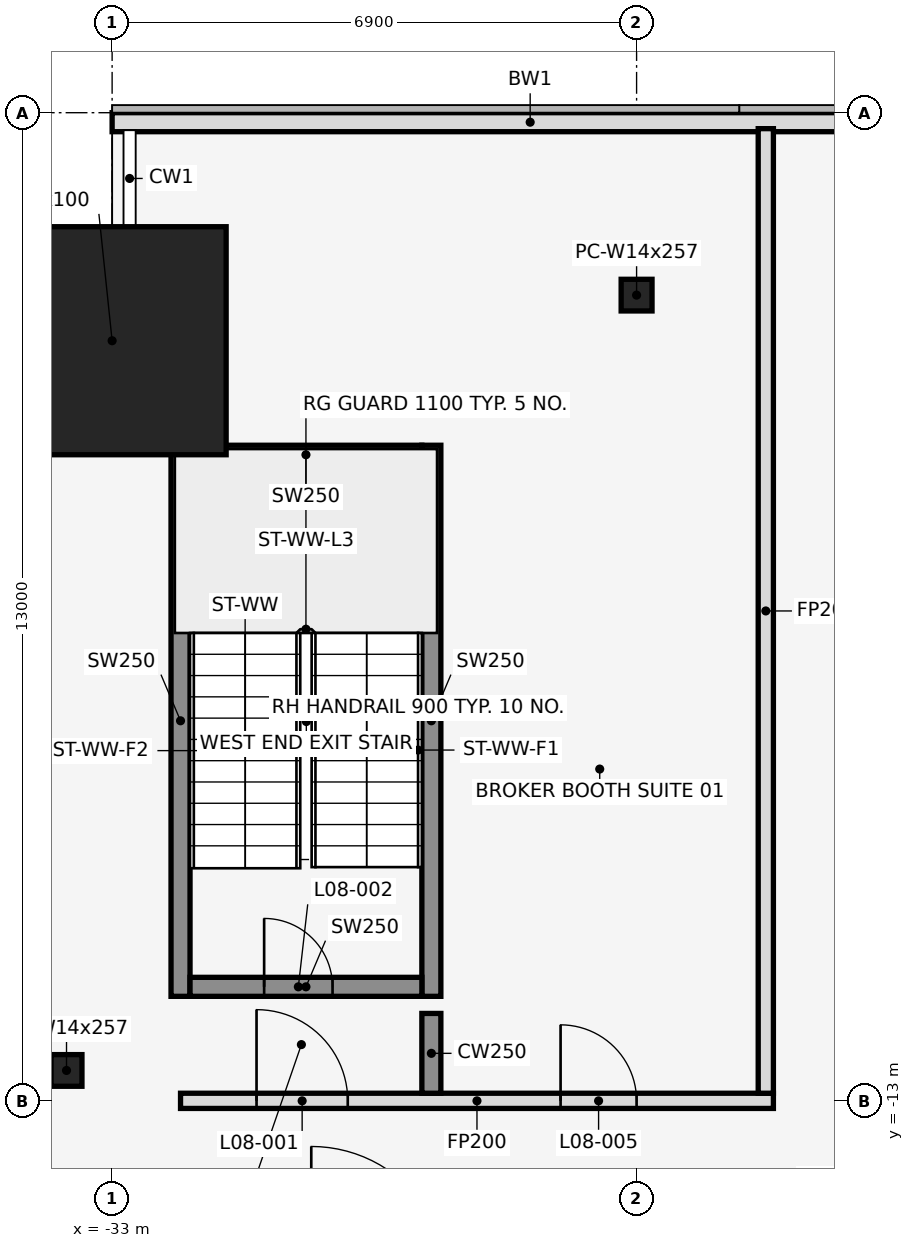
"""IFC4 building model, lengths in metres.
Left out: names, types, materials, properties, quantities, classifications, styles, units other than length and angle.
Written with IfcOpenShell. Run it as: python <this file> out.ifc"""

import sys

from ifc_helpers import new_model, si_unit, direction, frame, frame_2d, origin, origin_2d, place, context, subcontext, project, spatial, rectangle, hollow_rectangle, i_section, extrude, element, fill, save


model = new_model("IFC4")
c1 = context("Model", 3, precision=1e-05, world=origin(), true_north=direction((0.0, 1.0)))
c2 = subcontext(c1, "Body", "Model", "MODEL_VIEW")
j1 = project(units=[si_unit("LENGTHUNIT", "METRE"), si_unit("PLANEANGLEUNIT", "RADIAN")], contexts=[c1])
p1 = place(None, origin())
s1 = spatial("IfcSite", under=j1, at=p1, CompositionType="ELEMENT")
p2 = place(p1, origin())
s2 = spatial("IfcBuilding", under=s1, at=p2, CompositionType="ELEMENT")
p3 = place(p2, frame((0.0, 0.0, 44.0)))
s3 = spatial("IfcBuildingStorey", under=s2, at=p3, CompositionType="ELEMENT", Elevation=44.0)
p4 = place(p3, frame((-33.0, -3.0, 0.0), z_axis=(0.0, 0.0, 1.0), x_axis=(1.0, 0.0, 0.0)))
e1 = element("IfcColumn", 1, at=p4, inside=s3, PredefinedType="COLUMN", context=c2, shape_type="SweptSolid", body=[
    extrude(hollow_rectangle(XDim=3.0, YDim=3.0, WallThickness=0.1, at=origin_2d()), origin(), (0.0, 0.0, 1.0), 4.5),
])
for number, where, z_axis, x_axis in (
    (2, (-26.1, -2.4, 0.0), (0.0, 0.0, 1.0), (1.0, 0.0, 0.0)),
    (3, (-33.6, -12.6, 0.0), (0.0, 0.0, 1.0), (1.0, 0.0, 0.0)),
):
    element("IfcColumn", number, at=place(p3, frame(where, z_axis=z_axis, x_axis=x_axis)), inside=s3, PredefinedType="COLUMN", context=c2, shape_type="SweptSolid", body=[
        extrude(i_section(OverallWidth=0.406, OverallDepth=0.417, WebThickness=0.03, FlangeThickness=0.048, at=origin_2d()), origin(), (0.0, 0.0, 1.0), 4.5),
    ])
p5 = place(p3, frame((-22.0, -0.125, 0.0), z_axis=(0.0, 0.0, 1.0), x_axis=(-1.0, 0.0, 0.0)))
e4 = element("IfcWall", 4, at=p5, inside=s3, PredefinedType="STANDARD", context=c2, shape_type="SweptSolid", body=[
    extrude(rectangle(XDim=11.0, YDim=0.25, at=frame_2d((5.5, 0.0))), origin(), (0.0, 0.0, 1.0), 4.35),
])
for number, where, z_axis, x_axis in (
    (5, (-32.1, -11.625, 0.0), (0.0, 0.0, 1.0), (0.0, 1.0, 0.0)),
    (6, (-28.8, -11.625, 0.0), (0.0, 0.0, 1.0), (0.0, 1.0, 0.0)),
):
    element("IfcWall", number, at=place(p3, frame(where, z_axis=z_axis, x_axis=x_axis)), inside=s3, PredefinedType="SHEAR", context=c2, shape_type="SweptSolid", body=[
        extrude(rectangle(XDim=7.25, YDim=0.25, at=frame_2d((3.625, 0.0))), origin(), (0.0, 0.0, 1.0), 4.5),
    ])
p6 = place(p3, frame((-31.975, -11.5, 0.0), z_axis=(0.0, 0.0, 1.0), x_axis=(1.0, 0.0, 0.0)))
e7 = element("IfcWall", 7, at=p6, inside=s3, PredefinedType="SHEAR", context=c2, shape_type="SweptSolid", body=[
    extrude(rectangle(XDim=3.05, YDim=0.25, at=frame_2d((1.525, 0.0))), origin(), (0.0, 0.0, 1.0), 4.5),
])
p7 = place(p6, frame((0.975, 0.0, 0.0)))
e8 = element("IfcOpeningElement", 8, at=p7, cuts=e7, PredefinedType="OPENING", context=c2, shape_type="SweptSolid", body=[
    extrude(rectangle(XDim=0.9, YDim=2.1, at=frame_2d((0.45, 1.05))), frame((0.0, 0.137, 0.0), z_axis=(0.0, -1.0, 0.0), x_axis=(1.0, 0.0, 0.0)), (0.0, 0.0, 1.0), 0.274),
])
p8 = place(p3, frame((-31.975, -4.5, 0.0), z_axis=(0.0, 0.0, 1.0), x_axis=(1.0, 0.0, 0.0)))
e9 = element("IfcWall", 9, at=p8, inside=s3, PredefinedType="SHEAR", context=c2, shape_type="SweptSolid", body=[
    extrude(rectangle(XDim=3.05, YDim=0.25, at=frame_2d((1.525, 0.0))), origin(), (0.0, 0.0, 1.0), 4.5),
])
p9 = place(p3, frame((-32.1, -13.0, 0.0), z_axis=(0.0, 0.0, 1.0), x_axis=(1.0, 0.0, 0.0)))
e10 = element("IfcWall", 10, at=p9, inside=s3, PredefinedType="PARTITIONING", context=c2, shape_type="SweptSolid", body=[
    extrude(rectangle(XDim=7.8, YDim=0.2, at=frame_2d((3.9, 0.0))), origin(), (0.0, 0.0, 1.0), 3.418),
])
p10 = place(p9, frame((1.0, 0.0, 0.0)))
e11 = element("IfcOpeningElement", 11, at=p10, cuts=e10, PredefinedType="OPENING", context=c2, shape_type="SweptSolid", body=[
    extrude(rectangle(XDim=1.2, YDim=2.1, at=frame_2d((0.6, 1.05))), frame((0.0, 0.112, 0.0), z_axis=(0.0, -1.0, 0.0), x_axis=(1.0, 0.0, 0.0)), (0.0, 0.0, 1.0), 0.224),
])
p11 = place(p9, frame((5.0, 0.0, 0.0)))
e12 = element("IfcOpeningElement", 12, at=p11, cuts=e10, PredefinedType="OPENING", context=c2, shape_type="SweptSolid", body=[
    extrude(rectangle(XDim=1.0, YDim=2.1, at=frame_2d((0.5, 1.05))), frame((0.0, 0.112, 0.0), z_axis=(0.0, -1.0, 0.0), x_axis=(1.0, 0.0, 0.0)), (0.0, 0.0, 1.0), 0.224),
])
p12 = place(p3, frame((-28.8, -12.9, 0.0), z_axis=(0.0, 0.0, 1.0), x_axis=(0.0, 1.0, 0.0)))
e13 = element("IfcWall", 13, at=p12, inside=s3, PredefinedType="SHEAR", context=c2, shape_type="SweptSolid", body=[
    extrude(rectangle(XDim=1.05, YDim=0.25, at=frame_2d((0.525, 0.0))), origin(), (0.0, 0.0, 1.0), 4.5),
])
p13 = place(p3, frame((-24.4, -12.9, 0.0), z_axis=(0.0, 0.0, 1.0), x_axis=(0.0, 1.0, 0.0)))
e14 = element("IfcWall", 14, at=p13, inside=s3, PredefinedType="PARTITIONING", context=c2, shape_type="SweptSolid", body=[
    extrude(rectangle(XDim=12.69, YDim=0.2, at=frame_2d((6.345, 0.0))), origin(), (0.0, 0.0, 1.0), 3.418),
])
p14 = place(p10, origin())
e15 = element("IfcDoor", 15, at=p14, inside=s3, OperationType="SINGLE_SWING_LEFT", PredefinedType="DOOR", context=c2, shape_type="SweptSolid", body=[
    extrude(rectangle(XDim=1.2, YDim=2.1, at=frame_2d((0.6, 1.05))), frame((0.0, 0.025, 0.0), z_axis=(0.0, -1.0, 0.0), x_axis=(1.0, 0.0, 0.0)), (0.0, 0.0, 1.0), 0.05),
])
fill(e11, e15)
p15 = place(p7, origin())
e16 = element("IfcDoor", 16, at=p15, inside=s3, OperationType="SINGLE_SWING_LEFT", PredefinedType="DOOR", context=c2, shape_type="SweptSolid", body=[
    extrude(rectangle(XDim=0.9, YDim=2.1, at=frame_2d((0.45, 1.05))), frame((0.0, 0.025, 0.0), z_axis=(0.0, -1.0, 0.0), x_axis=(1.0, 0.0, 0.0)), (0.0, 0.0, 1.0), 0.05),
])
fill(e8, e16)
p16 = place(p11, origin())
e17 = element("IfcDoor", 17, at=p16, inside=s3, OperationType="SINGLE_SWING_LEFT", PredefinedType="DOOR", context=c2, shape_type="SweptSolid", body=[
    extrude(rectangle(XDim=1.0, YDim=2.1, at=frame_2d((0.5, 1.05))), frame((0.0, 0.025, 0.0), z_axis=(0.0, -1.0, 0.0), x_axis=(1.0, 0.0, 0.0)), (0.0, 0.0, 1.0), 0.05),
])
fill(e12, e17)
save(model, sys.argv[1])
